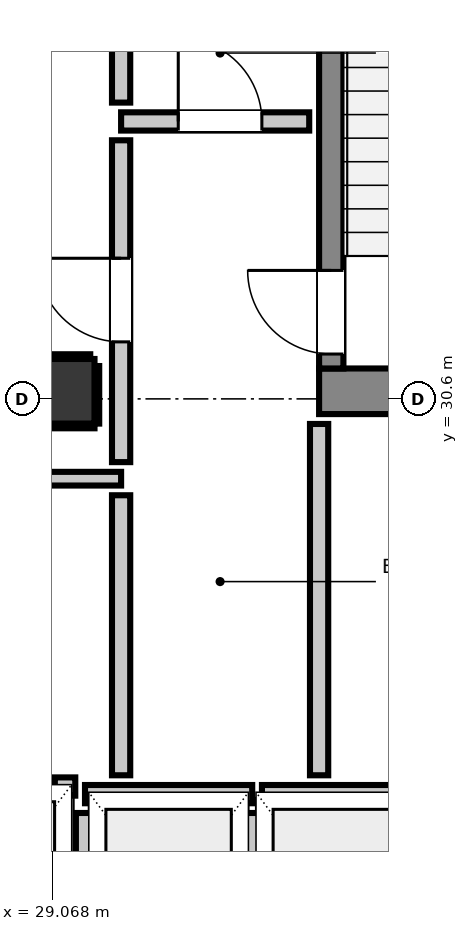
"""IFC4 building model, lengths in metres.
Left out: names, types, materials, properties, quantities, classifications, styles, units other than length and angle.
Written with IfcOpenShell. Run it as: python <this file> out.ifc"""

import sys

from ifc_helpers import new_model, si_unit, direction, frame, frame_2d, origin, origin_2d, place, context, subcontext, project, spatial, rectangle, extrude, element, fill, save


model = new_model("IFC4")
c1 = context("Model", 3, precision=1e-05, world=origin(), true_north=direction((0.0, 1.0)))
c2 = subcontext(c1, "Body", "Model", "MODEL_VIEW")
j1 = project(units=[si_unit("LENGTHUNIT", "METRE"), si_unit("PLANEANGLEUNIT", "RADIAN")], contexts=[c1])
p1 = place(None, origin())
s1 = spatial("IfcSite", under=j1, at=p1, CompositionType="ELEMENT")
p2 = place(p1, origin())
s2 = spatial("IfcBuilding", under=s1, at=p2, CompositionType="ELEMENT")
p3 = place(p2, frame((0.0, 0.0, 193.48)))
s3 = spatial("IfcBuildingStorey", under=s2, at=p3, CompositionType="ELEMENT", Elevation=193.48)
p4 = place(p3, frame((32.58, 30.7, 0.0), z_axis=(0.0, 0.0, 1.0), x_axis=(1.0, 0.0, 0.0)))
e1 = element("IfcWall", 1, at=p4, inside=s3, PredefinedType="SHEAR", context=c2, shape_type="SweptSolid", body=[
    extrude(rectangle(XDim=3.54, YDim=0.6, at=frame_2d((1.77, 0.0))), origin(), (0.0, 0.0, 1.0), 3.32),
])
p5 = place(p3, frame((32.74, 31.0, 0.0), z_axis=(0.0, 0.0, 1.0), x_axis=(0.0, 1.0, 0.0)))
e2 = element("IfcWall", 2, at=p5, inside=s3, PredefinedType="SHEAR", context=c2, shape_type="SweptSolid", body=[
    extrude(rectangle(XDim=7.8, YDim=0.32, at=frame_2d((3.9, 0.0))), origin(), (0.0, 0.0, 1.0), 3.32),
])
p6 = place(p5, frame((0.19, 0.0, 0.0)))
e3 = element("IfcOpeningElement", 3, at=p6, cuts=e2, PredefinedType="OPENING", context=c2, shape_type="SweptSolid", body=[
    extrude(rectangle(XDim=1.1, YDim=2.15, at=frame_2d((0.55, 1.075))), frame((0.0, 0.17, 0.0), z_axis=(0.0, -1.0, 0.0), x_axis=(1.0, 0.0, 0.0)), (0.0, 0.0, 1.0), 0.34),
])
p7 = place(p3, frame((29.2, 30.7, 0.0), z_axis=(0.0, 0.0, 1.0), x_axis=(1.0, 0.0, 0.0)))
e4 = element("IfcColumn", 4, at=p7, inside=s3, PredefinedType="COLUMN", context=c2, shape_type="SweptSolid", body=[
    extrude(rectangle(XDim=0.85, YDim=0.85, at=origin_2d()), origin(), (0.0, 0.0, 1.0), 3.32),
])
p8 = place(p3, frame((29.5, 25.4, 0.0), z_axis=(0.0, 0.0, 1.0), x_axis=(1.0, 0.0, 0.0)))
e5 = element("IfcWall", 5, at=p8, inside=s3, PredefinedType="PARTITIONING", context=c2, shape_type="SweptSolid", body=[
    extrude(rectangle(XDim=2.2, YDim=0.24, at=frame_2d((1.1, 0.0))), origin(), (0.0, 0.0, 1.0), 3.1),
])
p9 = place(p3, frame((29.5, 22.848, 0.0), z_axis=(0.0, 0.0, 1.0), x_axis=(0.0, 1.0, 0.0)))
e6 = element("IfcWall", 6, at=p9, inside=s3, PredefinedType="PARTITIONING", context=c2, shape_type="SweptSolid", body=[
    extrude(rectangle(XDim=2.304, YDim=0.24, at=frame_2d((1.152, 0.0))), origin(), (0.0, 0.0, 1.0), 2.335),
])
p10 = place(p3, frame((31.7, 22.848, 0.0), z_axis=(0.0, 0.0, 1.0), x_axis=(0.0, 1.0, 0.0)))
e7 = element("IfcWall", 7, at=p10, inside=s3, PredefinedType="PARTITIONING", context=c2, shape_type="SweptSolid", body=[
    extrude(rectangle(XDim=2.304, YDim=0.24, at=frame_2d((1.152, 0.0))), origin(), (0.0, 0.0, 1.0), 3.1),
])
p11 = place(p3, frame((31.828, 25.4, 0.0), z_axis=(0.0, 0.0, 1.0), x_axis=(1.0, 0.0, 0.0)))
e8 = element("IfcWall", 8, at=p11, inside=s3, PredefinedType="PARTITIONING", context=c2, shape_type="SweptSolid", body=[
    extrude(rectangle(XDim=2.072, YDim=0.24, at=frame_2d((1.036, 0.0))), origin(), (0.0, 0.0, 1.0), 3.1),
])
p12 = place(p3, frame((29.103, 25.5, 0.0), z_axis=(0.0, 0.0, 1.0), x_axis=(1.0, 0.0, 0.0)))
e9 = element("IfcWall", 9, at=p12, inside=s3, PredefinedType="PARTITIONING", context=c2, shape_type="SweptSolid", body=[
    extrude(rectangle(XDim=0.269, YDim=0.24, at=frame_2d((0.135, 0.0))), origin(), (0.0, 0.0, 1.0), 3.1),
])
p13 = place(p3, frame((29.975, 34.25, 0.0), z_axis=(0.0, 0.0, 1.0), x_axis=(1.0, 0.0, 0.0)))
e10 = element("IfcWall", 10, at=p13, inside=s3, PredefinedType="PARTITIONING", context=c2, shape_type="SweptSolid", body=[
    extrude(rectangle(XDim=2.475, YDim=0.24, at=frame_2d((1.237, 0.0))), origin(), (0.0, 0.0, 1.0), 3.1),
])
p14 = place(p13, frame((0.752, 0.0, 0.0)))
e11 = element("IfcOpeningElement", 11, at=p14, cuts=e10, PredefinedType="OPENING", context=c2, shape_type="SweptSolid", body=[
    extrude(rectangle(XDim=1.1, YDim=2.15, at=frame_2d((0.55, 1.075))), frame((0.0, 0.13, 0.0), z_axis=(0.0, -1.0, 0.0), x_axis=(1.0, 0.0, 0.0)), (0.0, 0.0, 1.0), 0.26),
])
p15 = place(p3, frame((28.593, 29.55, 0.0), z_axis=(0.0, 0.0, 1.0), x_axis=(1.0, 0.0, 0.0)))
e12 = element("IfcWall", 12, at=p15, inside=s3, PredefinedType="PARTITIONING", context=c2, shape_type="SweptSolid", body=[
    extrude(rectangle(XDim=1.382, YDim=0.18, at=frame_2d((0.691, 0.0))), origin(), (0.0, 0.0, 1.0), 3.1),
])
p16 = place(p3, frame((29.975, 25.648, 0.0), z_axis=(0.0, 0.0, 1.0), x_axis=(0.0, 1.0, 0.0)))
e13 = element("IfcWall", 13, at=p16, inside=s3, PredefinedType="PARTITIONING", context=c2, shape_type="SweptSolid", body=[
    extrude(rectangle(XDim=3.684, YDim=0.24, at=frame_2d((1.842, 0.0))), origin(), (0.0, 0.0, 1.0), 3.1),
])
p17 = place(p3, frame((29.975, 29.768, 0.0), z_axis=(0.0, 0.0, 1.0), x_axis=(0.0, 1.0, 0.0)))
e14 = element("IfcWall", 14, at=p17, inside=s3, PredefinedType="PARTITIONING", context=c2, shape_type="SweptSolid", body=[
    extrude(rectangle(XDim=4.234, YDim=0.24, at=frame_2d((2.117, 0.0))), origin(), (0.0, 0.0, 1.0), 3.1),
])
p18 = place(p17, frame((1.582, 0.0, 0.0)))
e15 = element("IfcOpeningElement", 15, at=p18, cuts=e14, PredefinedType="OPENING", context=c2, shape_type="SweptSolid", body=[
    extrude(rectangle(XDim=1.1, YDim=2.15, at=frame_2d((0.55, 1.075))), frame((0.0, 0.13, 0.0), z_axis=(0.0, -1.0, 0.0), x_axis=(1.0, 0.0, 0.0)), (0.0, 0.0, 1.0), 0.26),
])
p19 = place(p3, frame((29.975, 34.498, 0.0), z_axis=(0.0, 0.0, 1.0), x_axis=(0.0, 1.0, 0.0)))
e16 = element("IfcWall", 16, at=p19, inside=s3, PredefinedType="PARTITIONING", context=c2, shape_type="SweptSolid", body=[
    extrude(rectangle(XDim=0.924, YDim=0.24, at=frame_2d((0.462, 0.0))), origin(), (0.0, 0.0, 1.0), 3.1),
])
p20 = place(p3, frame((32.58, 25.648, 0.0), z_axis=(0.0, 0.0, 1.0), x_axis=(0.0, 1.0, 0.0)))
e17 = element("IfcWall", 17, at=p20, inside=s3, PredefinedType="PARTITIONING", context=c2, shape_type="SweptSolid", body=[
    extrude(rectangle(XDim=4.622, YDim=0.24, at=frame_2d((2.311, 0.0))), origin(), (0.0, 0.0, 1.0), 3.1),
])
p21 = place(p3, frame((28.775, 30.243, 0.0), z_axis=(0.0, 0.0, 1.0), x_axis=(1.0, 0.0, 0.0)))
e18 = element("IfcWall", 18, at=p21, inside=s3, PredefinedType="PARTITIONING", context=c2, shape_type="SweptSolid", body=[
    extrude(rectangle(XDim=0.85, YDim=0.06, at=frame_2d((0.425, 0.0))), origin(), (0.0, 0.0, 1.0), 1.45),
])
p22 = place(p3, frame((28.775, 31.157, 0.0), z_axis=(0.0, 0.0, 1.0), x_axis=(1.0, 0.0, 0.0)))
e19 = element("IfcWall", 19, at=p22, inside=s3, PredefinedType="PARTITIONING", context=c2, shape_type="SweptSolid", body=[
    extrude(rectangle(XDim=0.794, YDim=0.06, at=frame_2d((0.397, 0.0))), origin(), (0.0, 0.0, 1.0), 1.45),
])
p23 = place(p3, frame((29.657, 30.275, 0.0), z_axis=(0.0, 0.0, 1.0), x_axis=(0.0, 1.0, 0.0)))
e20 = element("IfcWall", 20, at=p23, inside=s3, PredefinedType="PARTITIONING", context=c2, shape_type="SweptSolid", body=[
    extrude(rectangle(XDim=0.757, YDim=0.06, at=frame_2d((0.378, 0.0))), origin(), (0.0, 0.0, 1.0), 1.45),
])
p24 = place(p6, origin())
e21 = element("IfcDoor", 21, at=p24, inside=s3, OperationType="SINGLE_SWING_RIGHT", PredefinedType="DOOR", context=c2, shape_type="SweptSolid", body=[
    extrude(rectangle(XDim=1.1, YDim=2.15, at=frame_2d((0.55, 1.075))), frame((0.0, 0.025, 0.0), z_axis=(0.0, -1.0, 0.0), x_axis=(1.0, 0.0, 0.0)), (0.0, 0.0, 1.0), 0.05),
])
fill(e3, e21)
p25 = place(p18, origin())
e22 = element("IfcDoor", 22, at=p25, inside=s3, OperationType="SINGLE_SWING_RIGHT", PredefinedType="DOOR", context=c2, shape_type="SweptSolid", body=[
    extrude(rectangle(XDim=1.1, YDim=2.15, at=frame_2d((0.55, 1.075))), frame((0.0, 0.025, 0.0), z_axis=(0.0, -1.0, 0.0), x_axis=(1.0, 0.0, 0.0)), (0.0, 0.0, 1.0), 0.05),
])
fill(e15, e22)
p26 = place(p14, origin())
e23 = element("IfcDoor", 23, at=p26, inside=s3, OperationType="SINGLE_SWING_LEFT", PredefinedType="DOOR", context=c2, shape_type="SweptSolid", body=[
    extrude(rectangle(XDim=1.1, YDim=2.15, at=frame_2d((0.55, 1.075))), frame((0.0, 0.025, 0.0), z_axis=(0.0, -1.0, 0.0), x_axis=(1.0, 0.0, 0.0)), (0.0, 0.0, 1.0), 0.05),
])
fill(e11, e23)
save(model, sys.argv[1])
